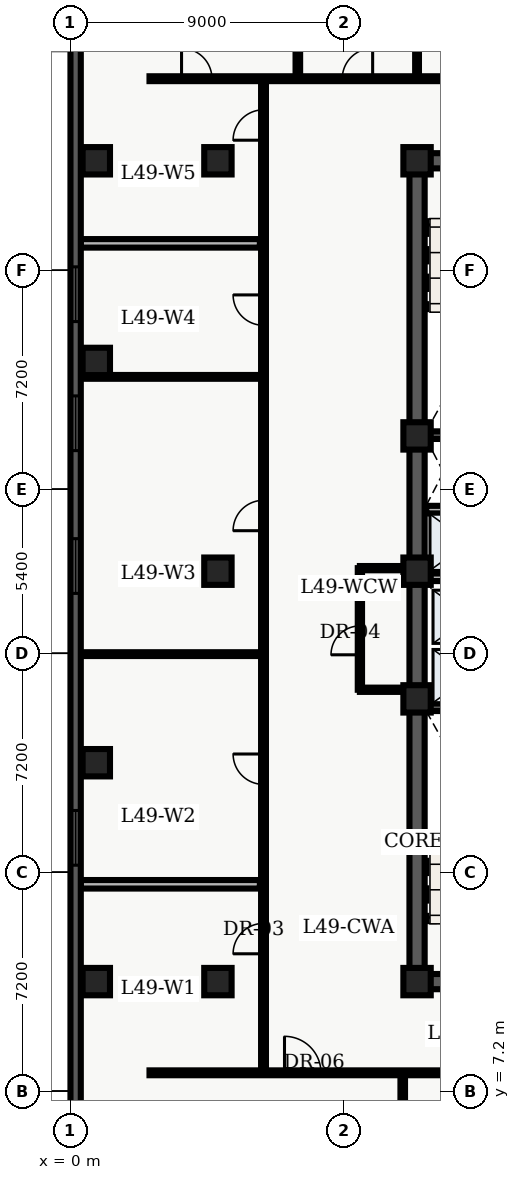
"""IFC4 building model, lengths in metres.
Left out: names, types, materials, properties, quantities, classifications, styles, units other than length and angle.
Written with IfcOpenShell. Run it as: python <this file> out.ifc"""

import sys

from ifc_helpers import new_model, entity, si_unit, converted_unit, direction, frame, origin_with_axes, origin_2d_with_axis, place, context, subcontext, project, spatial, polyline, rectangle, outline, extrude, element, fill, save


model = new_model("IFC4")
c1 = context("Model", 3, precision=1e-05, world=origin_with_axes(), true_north=direction((0.0, 1.0)))
c2 = subcontext(c1, "Body", "Model", "MODEL_VIEW")
j1 = project(units=[si_unit("LENGTHUNIT", "METRE"), converted_unit("PLANEANGLEUNIT", "DEGREE", entity("IfcPlaneAngleMeasure", 0.017), si_unit("PLANEANGLEUNIT", "RADIAN"), dimensions=[0, 0, 0, 0, 0, 0, 0])], contexts=[c1])
p1 = place(None, origin_with_axes())
s1 = spatial("IfcSite", under=j1, at=p1, CompositionType="ELEMENT")
p2 = place(p1, origin_with_axes())
s2 = spatial("IfcBuilding", under=s1, at=p2, CompositionType="ELEMENT")
p3 = place(p2, frame((0.0, 0.0, 200.4), z_axis=(0.0, 0.0, 1.0), x_axis=(1.0, 0.0, 0.0)))
s3 = spatial("IfcBuildingStorey", under=s2, at=p3, CompositionType="ELEMENT", Elevation=200.4)
p4 = place(p3, frame((11.4, 10.8, 0.0), z_axis=(0.0, 0.0, 1.0), x_axis=(0.0, 1.0, 0.0)))
e1 = element("IfcWall", 1, at=p4, inside=s3, PredefinedType="SHEAR", context=c2, shape_type="SweptSolid", body=[
    extrude(outline(polyline([(0.0, -0.25), (27.0, -0.25), (27.0, 0.25), (0.0, 0.25), (0.0, -0.25)])), origin_with_axes(), (0.0, 0.0, 1.0), 3.66),
])
p5 = place(p3, frame((11.4, 10.8, 0.0), z_axis=(0.0, 0.0, 1.0), x_axis=(1.0, 0.0, 0.0)))
e2 = element("IfcWall", 2, at=p5, inside=s3, PredefinedType="SHEAR", context=c2, shape_type="SweptSolid", body=[
    extrude(outline(polyline([(0.0, -0.25), (7.2, -0.25), (7.2, 0.25), (0.0, 0.25), (0.0, -0.25)])), origin_with_axes(), (0.0, 0.0, 1.0), 3.66),
])
p6 = place(p5, frame((2.625, 0.0, 0.0), z_axis=(0.0, 0.0, 1.0), x_axis=(1.0, 0.0, 0.0)))
e3 = element("IfcOpeningElement", 3, at=p6, cuts=e2, PredefinedType="OPENING", context=c2, shape_type="SweptSolid", body=[
    extrude(rectangle(XDim=1.05, YDim=0.52, at=origin_2d_with_axis()), origin_with_axes(), (0.0, 0.0, 1.0), 2.15),
])
p7 = place(p3, frame((11.4, 37.8, 0.0), z_axis=(0.0, 0.0, 1.0), x_axis=(1.0, 0.0, 0.0)))
e4 = element("IfcWall", 4, at=p7, inside=s3, PredefinedType="SHEAR", context=c2, shape_type="SweptSolid", body=[
    extrude(outline(polyline([(0.0, -0.25), (7.2, -0.25), (7.2, 0.25), (0.0, 0.25), (0.0, -0.25)])), origin_with_axes(), (0.0, 0.0, 1.0), 3.66),
])
p8 = place(p7, frame((2.625, 0.0, 0.0), z_axis=(0.0, 0.0, 1.0), x_axis=(1.0, 0.0, 0.0)))
e5 = element("IfcOpeningElement", 5, at=p8, cuts=e4, PredefinedType="OPENING", context=c2, shape_type="SweptSolid", body=[
    extrude(rectangle(XDim=1.05, YDim=0.52, at=origin_2d_with_axis()), origin_with_axes(), (0.0, 0.0, 1.0), 2.15),
])
for number, where, z_axis, x_axis in (
    (6, (11.65, 19.825, 0.0), (0.0, 0.0, 1.0), (1.0, 0.0, 0.0)),
    (7, (11.65, 28.775, 0.0), (0.0, 0.0, 1.0), (1.0, 0.0, 0.0)),
):
    element("IfcWall", number, at=place(p3, frame(where, z_axis=z_axis, x_axis=x_axis)), inside=s3, PredefinedType="SHEAR", context=c2, shape_type="SweptSolid", body=[
        extrude(outline(polyline([(0.0, -0.125), (6.7, -0.125), (6.7, 0.125), (0.0, 0.125), (0.0, -0.125)])), origin_with_axes(), (0.0, 0.0, 1.0), 3.66),
    ])
p9 = place(p3, frame((11.7, 24.1, 0.0), z_axis=(0.0, 0.0, 1.0), x_axis=(1.0, 0.0, 0.0)))
e8 = element("IfcWall", 8, at=p9, inside=s3, PredefinedType="SOLIDWALL", context=c2, shape_type="SweptSolid", body=[
    extrude(outline(polyline([(0.0, -0.125), (6.6, -0.125), (6.6, 0.125), (0.0, 0.125), (0.0, -0.125)])), origin_with_axes(), (0.0, 0.0, 1.0), 2.7),
])
p10 = place(p9, frame((3.75, 0.0, 0.0), z_axis=(0.0, 0.0, 1.0), x_axis=(1.0, 0.0, 0.0)))
e9 = element("IfcOpeningElement", 9, at=p10, cuts=e8, PredefinedType="OPENING", context=c2, shape_type="SweptSolid", body=[
    extrude(rectangle(XDim=0.9, YDim=0.27, at=origin_2d_with_axis()), origin_with_axes(), (0.0, 0.0, 1.0), 2.15),
])
p11 = place(p3, frame((11.7, 26.325, 0.0), z_axis=(0.0, 0.0, 1.0), x_axis=(1.0, 0.0, 0.0)))
e10 = element("IfcWall", 10, at=p11, inside=s3, PredefinedType="SOLIDWALL", context=c2, shape_type="SweptSolid", body=[
    extrude(outline(polyline([(0.0, -0.125), (6.6, -0.125), (6.6, 0.125), (0.0, 0.125), (0.0, -0.125)])), origin_with_axes(), (0.0, 0.0, 1.0), 2.7),
])
p12 = place(p11, frame((3.5, 0.0, 0.0), z_axis=(0.0, 0.0, 1.0), x_axis=(1.0, 0.0, 0.0)))
e11 = element("IfcOpeningElement", 11, at=p12, cuts=e10, PredefinedType="OPENING", context=c2, shape_type="SweptSolid", body=[
    extrude(rectangle(XDim=0.9, YDim=0.27, at=origin_2d_with_axis()), origin_with_axes(), (0.0, 0.0, 1.0), 2.15),
])
for number, where, z_axis, x_axis in (
    (12, (11.4, 10.8, 0.0), (0.0, 0.0, 1.0), (1.0, 0.0, 0.0)),
    (13, (11.4, 20.1, 0.0), (0.0, 0.0, 1.0), (1.0, 0.0, 0.0)),
    (14, (11.4, 24.3, 0.0), (0.0, 0.0, 1.0), (1.0, 0.0, 0.0)),
    (15, (11.4, 28.75, 0.0), (0.0, 0.0, 1.0), (1.0, 0.0, 0.0)),
    (16, (11.4, 37.8, 0.0), (0.0, 0.0, 1.0), (1.0, 0.0, 0.0)),
    (17, (4.85, 10.8, 0.0), (0.0, 0.0, 1.0), (1.0, 0.0, 0.0)),
    (18, (4.85, 24.3, 0.0), (0.0, 0.0, 1.0), (1.0, 0.0, 0.0)),
    (19, (4.85, 37.8, 0.0), (0.0, 0.0, 1.0), (1.0, 0.0, 0.0)),
    (20, (0.85, 10.8, 0.0), (0.0, 0.0, 1.0), (1.0, 0.0, 0.0)),
    (21, (0.85, 18.0, 0.0), (0.0, 0.0, 1.0), (1.0, 0.0, 0.0)),
    (22, (0.85, 31.2, 0.0), (0.0, 0.0, 1.0), (1.0, 0.0, 0.0)),
    (23, (0.85, 37.8, 0.0), (0.0, 0.0, 1.0), (1.0, 0.0, 0.0)),
):
    element("IfcColumn", number, at=place(p3, frame(where, z_axis=z_axis, x_axis=x_axis)), inside=s3, PredefinedType="COLUMN", context=c2, shape_type="SweptSolid", body=[
        extrude(rectangle(XDim=0.9, YDim=0.9, at=origin_2d_with_axis()), origin_with_axes(), (0.0, 0.0, 1.0), 3.9),
    ])
p13 = place(p3, frame((9.52, 20.4, 0.0), z_axis=(0.0, 0.0, 1.0), x_axis=(0.0, 1.0, 0.0)))
e24 = element("IfcWall", 24, at=p13, inside=s3, PredefinedType="PARTITIONING", context=c2, shape_type="SweptSolid", body=[
    extrude(outline(polyline([(0.0, -0.07), (4.0, -0.07), (4.0, 0.07), (0.0, 0.07), (0.0, -0.07)])), origin_with_axes(), (0.0, 0.0, 1.0), 2.7),
])
p14 = place(p13, frame((1.625, 0.0, 0.0), z_axis=(0.0, 0.0, 1.0), x_axis=(1.0, 0.0, 0.0)))
e25 = element("IfcOpeningElement", 25, at=p14, cuts=e24, PredefinedType="OPENING", context=c2, shape_type="SweptSolid", body=[
    extrude(rectangle(XDim=0.95, YDim=0.16, at=origin_2d_with_axis()), origin_with_axes(), (0.0, 0.0, 1.0), 2.15),
])
for number, where, z_axis, x_axis in (
    (26, (9.52, 20.4, 0.0), (0.0, 0.0, 1.0), (1.0, 0.0, 0.0)),
    (27, (9.52, 24.4, 0.0), (0.0, 0.0, 1.0), (1.0, 0.0, 0.0)),
):
    element("IfcWall", number, at=place(p3, frame(where, z_axis=z_axis, x_axis=x_axis)), inside=s3, PredefinedType="PARTITIONING", context=c2, shape_type="SweptSolid", body=[
        extrude(outline(polyline([(0.0, -0.07), (1.58, -0.07), (1.58, 0.07), (0.0, 0.07), (0.0, -0.07)])), origin_with_axes(), (0.0, 0.0, 1.0), 2.7),
    ])
p15 = place(p3, frame((2.6, 7.8, 0.0), z_axis=(0.0, 0.0, 1.0), x_axis=(1.0, 0.0, 0.0)))
e28 = element("IfcWall", 28, at=p15, inside=s3, PredefinedType="PARTITIONING", context=c2, shape_type="SweptSolid", body=[
    extrude(outline(polyline([(0.0, -0.08), (18.55, -0.08), (18.55, 0.08), (0.0, 0.08), (0.0, -0.08)])), origin_with_axes(), (0.0, 0.0, 1.0), 2.7),
])
p16 = place(p15, frame((5.04, 0.0, 0.0), z_axis=(0.0, 0.0, 1.0), x_axis=(1.0, 0.0, 0.0)))
e29 = element("IfcOpeningElement", 29, at=p16, cuts=e28, PredefinedType="OPENING", context=c2, shape_type="SweptSolid", body=[
    extrude(rectangle(XDim=1.2, YDim=0.18, at=origin_2d_with_axis()), origin_with_axes(), (0.0, 0.0, 1.0), 2.2),
])
p17 = place(p15, frame((13.415, 0.0, 0.0), z_axis=(0.0, 0.0, 1.0), x_axis=(1.0, 0.0, 0.0)))
e30 = element("IfcOpeningElement", 30, at=p17, cuts=e28, PredefinedType="OPENING", context=c2, shape_type="SweptSolid", body=[
    extrude(rectangle(XDim=1.0, YDim=0.18, at=origin_2d_with_axis()), origin_with_axes(), (0.0, 0.0, 1.0), 2.15),
])
p18 = place(p3, frame((2.6, 40.5, 0.0), z_axis=(0.0, 0.0, 1.0), x_axis=(1.0, 0.0, 0.0)))
e31 = element("IfcWall", 31, at=p18, inside=s3, PredefinedType="PARTITIONING", context=c2, shape_type="SweptSolid", body=[
    extrude(outline(polyline([(0.0, -0.08), (26.177, -0.08), (26.177, 0.08), (0.0, 0.08), (0.0, -0.08)])), origin_with_axes(), (0.0, 0.0, 1.0), 2.7),
])
p19 = place(p18, frame((1.554, 0.0, 0.0), z_axis=(0.0, 0.0, 1.0), x_axis=(1.0, 0.0, 0.0)))
e32 = element("IfcOpeningElement", 32, at=p19, cuts=e31, PredefinedType="OPENING", context=c2, shape_type="SweptSolid", body=[
    extrude(rectangle(XDim=1.0, YDim=0.18, at=origin_2d_with_axis()), origin_with_axes(), (0.0, 0.0, 1.0), 2.15),
])
p20 = place(p18, frame((6.84, 0.0, 0.0), z_axis=(0.0, 0.0, 1.0), x_axis=(1.0, 0.0, 0.0)))
e33 = element("IfcOpeningElement", 33, at=p20, cuts=e31, PredefinedType="OPENING", context=c2, shape_type="SweptSolid", body=[
    extrude(rectangle(XDim=1.0, YDim=0.18, at=origin_2d_with_axis()), origin_with_axes(), (0.0, 0.0, 1.0), 2.15),
])
p21 = place(p18, frame((10.996, 0.0, 0.0), z_axis=(0.0, 0.0, 1.0), x_axis=(1.0, 0.0, 0.0)))
e34 = element("IfcOpeningElement", 34, at=p21, cuts=e31, PredefinedType="OPENING", context=c2, shape_type="SweptSolid", body=[
    extrude(rectangle(XDim=1.0, YDim=0.18, at=origin_2d_with_axis()), origin_with_axes(), (0.0, 0.0, 1.0), 2.15),
])
p22 = place(p18, frame((15.636, 0.0, 0.0), z_axis=(0.0, 0.0, 1.0), x_axis=(1.0, 0.0, 0.0)))
e35 = element("IfcOpeningElement", 35, at=p22, cuts=e31, PredefinedType="OPENING", context=c2, shape_type="SweptSolid", body=[
    extrude(rectangle(XDim=1.0, YDim=0.18, at=origin_2d_with_axis()), origin_with_axes(), (0.0, 0.0, 1.0), 2.15),
])
p23 = place(p3, frame((6.35, 7.8, 0.0), z_axis=(0.0, 0.0, 1.0), x_axis=(0.0, 1.0, 0.0)))
e36 = element("IfcWall", 36, at=p23, inside=s3, PredefinedType="PARTITIONING", context=c2, shape_type="SweptSolid", body=[
    extrude(outline(polyline([(0.0, -0.08), (32.7, -0.08), (32.7, 0.08), (0.0, 0.08), (0.0, -0.08)])), origin_with_axes(), (0.0, 0.0, 1.0), 2.7),
])
p24 = place(p23, frame((4.415, 0.0, 0.0), z_axis=(0.0, 0.0, 1.0), x_axis=(1.0, 0.0, 0.0)))
e37 = element("IfcOpeningElement", 37, at=p24, cuts=e36, PredefinedType="OPENING", context=c2, shape_type="SweptSolid", body=[
    extrude(rectangle(XDim=1.0, YDim=0.18, at=origin_2d_with_axis()), origin_with_axes(), (0.0, 0.0, 1.0), 2.15),
])
p25 = place(p23, frame((9.986, 0.0, 0.0), z_axis=(0.0, 0.0, 1.0), x_axis=(1.0, 0.0, 0.0)))
e38 = element("IfcOpeningElement", 38, at=p25, cuts=e36, PredefinedType="OPENING", context=c2, shape_type="SweptSolid", body=[
    extrude(rectangle(XDim=1.0, YDim=0.18, at=origin_2d_with_axis()), origin_with_axes(), (0.0, 0.0, 1.0), 2.15),
])
p26 = place(p23, frame((18.332, 0.0, 0.0), z_axis=(0.0, 0.0, 1.0), x_axis=(1.0, 0.0, 0.0)))
e39 = element("IfcOpeningElement", 39, at=p26, cuts=e36, PredefinedType="OPENING", context=c2, shape_type="SweptSolid", body=[
    extrude(rectangle(XDim=1.0, YDim=0.18, at=origin_2d_with_axis()), origin_with_axes(), (0.0, 0.0, 1.0), 2.15),
])
p27 = place(p23, frame((25.088, 0.0, 0.0), z_axis=(0.0, 0.0, 1.0), x_axis=(1.0, 0.0, 0.0)))
e40 = element("IfcOpeningElement", 40, at=p27, cuts=e36, PredefinedType="OPENING", context=c2, shape_type="SweptSolid", body=[
    extrude(rectangle(XDim=1.0, YDim=0.18, at=origin_2d_with_axis()), origin_with_axes(), (0.0, 0.0, 1.0), 2.15),
])
p28 = place(p23, frame((31.177, 0.0, 0.0), z_axis=(0.0, 0.0, 1.0), x_axis=(1.0, 0.0, 0.0)))
e41 = element("IfcOpeningElement", 41, at=p28, cuts=e36, PredefinedType="OPENING", context=c2, shape_type="SweptSolid", body=[
    extrude(rectangle(XDim=1.0, YDim=0.18, at=origin_2d_with_axis()), origin_with_axes(), (0.0, 0.0, 1.0), 2.15),
])
p29 = place(p3, frame((0.335, 14.001, 0.0), z_axis=(0.0, 0.0, 1.0), x_axis=(1.0, 0.0, 0.0)))
e42 = element("IfcWall", 42, at=p29, inside=s3, PredefinedType="PARTITIONING", context=c2, shape_type="SweptSolid", body=[
    extrude(outline(polyline([(0.0, -0.14), (5.895, -0.14), (5.895, 0.14), (0.0, 0.14), (0.0, -0.14)])), origin_with_axes(), (0.0, 0.0, 1.0), 2.7),
])
for number, where, z_axis, x_axis in (
    (43, (0.335, 21.572, 0.0), (0.0, 0.0, 1.0), (1.0, 0.0, 0.0)),
    (44, (0.335, 30.692, 0.0), (0.0, 0.0, 1.0), (1.0, 0.0, 0.0)),
):
    element("IfcWall", number, at=place(p3, frame(where, z_axis=z_axis, x_axis=x_axis)), inside=s3, PredefinedType="PARTITIONING", context=c2, shape_type="SweptSolid", body=[
        extrude(outline(polyline([(0.0, -0.062), (5.895, -0.062), (5.895, 0.062), (0.0, 0.062), (0.0, -0.062)])), origin_with_axes(), (0.0, 0.0, 1.0), 2.7),
    ])
p30 = place(p3, frame((0.335, 35.084, 0.0), z_axis=(0.0, 0.0, 1.0), x_axis=(1.0, 0.0, 0.0)))
e45 = element("IfcWall", 45, at=p30, inside=s3, PredefinedType="PARTITIONING", context=c2, shape_type="SweptSolid", body=[
    extrude(outline(polyline([(0.0, -0.14), (5.895, -0.14), (5.895, 0.14), (0.0, 0.14), (0.0, -0.14)])), origin_with_axes(), (0.0, 0.0, 1.0), 2.7),
])
p31 = place(p3, frame((10.929, 0.335, 0.0), z_axis=(0.0, 0.0, 1.0), x_axis=(0.0, 1.0, 0.0)))
e46 = element("IfcWall", 46, at=p31, inside=s3, PredefinedType="PARTITIONING", context=c2, shape_type="SweptSolid", body=[
    extrude(outline(polyline([(0.0, -0.075), (7.365, -0.075), (7.365, 0.075), (0.0, 0.075), (0.0, -0.075)])), origin_with_axes(), (0.0, 0.0, 1.0), 2.7),
])
p32 = place(p3, frame((7.479, 40.6, 0.0), z_axis=(0.0, 0.0, 1.0), x_axis=(0.0, 1.0, 0.0)))
e47 = element("IfcWall", 47, at=p32, inside=s3, PredefinedType="PARTITIONING", context=c2, shape_type="SweptSolid", body=[
    extrude(outline(polyline([(0.0, -0.075), (7.665, -0.075), (7.665, 0.075), (0.0, 0.075), (0.0, -0.075)])), origin_with_axes(), (0.0, 0.0, 1.0), 2.7),
])
p33 = place(p3, frame((11.4, 40.6, 0.0), z_axis=(0.0, 0.0, 1.0), x_axis=(0.0, 1.0, 0.0)))
e48 = element("IfcWall", 48, at=p33, inside=s3, PredefinedType="PARTITIONING", context=c2, shape_type="SweptSolid", body=[
    extrude(outline(polyline([(0.0, -0.062), (7.665, -0.062), (7.665, 0.062), (0.0, 0.062), (0.0, -0.062)])), origin_with_axes(), (0.0, 0.0, 1.0), 2.7),
])
p34 = place(p3, frame((0.17, 2.74, 0.0), z_axis=(0.0, 0.0, 1.0), x_axis=(0.0, 1.0, 0.0)))
e49 = element("IfcWall", 49, at=p34, inside=s3, PredefinedType="SOLIDWALL", context=c2, shape_type="SweptSolid", body=[
    extrude(outline(polyline([(0.0, -0.17), (43.46, -0.17), (43.46, 0.17), (0.0, 0.17), (0.0, -0.17)])), origin_with_axes(), (0.0, 0.0, 1.0), 3.66),
])
p35 = place(p34, frame((2.948, 0.0, 0.45), z_axis=(0.0, 0.0, 1.0), x_axis=(1.0, 0.0, 0.0)))
e50 = element("IfcOpeningElement", 50, at=p35, cuts=e49, PredefinedType="OPENING", context=c2, shape_type="SweptSolid", body=[
    extrude(rectangle(XDim=1.8, YDim=0.36, at=origin_2d_with_axis()), origin_with_axes(), (0.0, 0.0, 1.0), 2.1),
])
p36 = place(p34, frame((12.789, 0.0, 0.45), z_axis=(0.0, 0.0, 1.0), x_axis=(1.0, 0.0, 0.0)))
e51 = element("IfcOpeningElement", 51, at=p36, cuts=e49, PredefinedType="OPENING", context=c2, shape_type="SweptSolid", body=[
    extrude(rectangle(XDim=1.8, YDim=0.36, at=origin_2d_with_axis()), origin_with_axes(), (0.0, 0.0, 1.0), 2.1),
])
p37 = place(p34, frame((21.73, 0.0, 0.45), z_axis=(0.0, 0.0, 1.0), x_axis=(1.0, 0.0, 0.0)))
e52 = element("IfcOpeningElement", 52, at=p37, cuts=e49, PredefinedType="OPENING", context=c2, shape_type="SweptSolid", body=[
    extrude(rectangle(XDim=1.8, YDim=0.36, at=origin_2d_with_axis()), origin_with_axes(), (0.0, 0.0, 1.0), 2.1),
])
p38 = place(p34, frame((26.426, 0.0, 0.45), z_axis=(0.0, 0.0, 1.0), x_axis=(1.0, 0.0, 0.0)))
e53 = element("IfcOpeningElement", 53, at=p38, cuts=e49, PredefinedType="OPENING", context=c2, shape_type="SweptSolid", body=[
    extrude(rectangle(XDim=1.8, YDim=0.36, at=origin_2d_with_axis()), origin_with_axes(), (0.0, 0.0, 1.0), 2.1),
])
p39 = place(p34, frame((30.671, 0.0, 0.45), z_axis=(0.0, 0.0, 1.0), x_axis=(1.0, 0.0, 0.0)))
e54 = element("IfcOpeningElement", 54, at=p39, cuts=e49, PredefinedType="OPENING", context=c2, shape_type="SweptSolid", body=[
    extrude(rectangle(XDim=1.8, YDim=0.36, at=origin_2d_with_axis()), origin_with_axes(), (0.0, 0.0, 1.0), 2.1),
])
p40 = place(p34, frame((40.062, 0.0, 0.45), z_axis=(0.0, 0.0, 1.0), x_axis=(1.0, 0.0, 0.0)))
e55 = element("IfcOpeningElement", 55, at=p40, cuts=e49, PredefinedType="OPENING", context=c2, shape_type="SweptSolid", body=[
    extrude(rectangle(XDim=1.8, YDim=0.36, at=origin_2d_with_axis()), origin_with_axes(), (0.0, 0.0, 1.0), 2.1),
])
p41 = place(p13, frame((1.625, 0.0, 0.0), z_axis=(0.0, 0.0, 1.0), x_axis=(1.0, 0.0, 0.0)))
e56 = element("IfcDoor", 56, at=p41, inside=s3, OperationType="SINGLE_SWING_LEFT", PredefinedType="DOOR", context=c2, shape_type="SweptSolid", body=[
    extrude(rectangle(XDim=0.95, YDim=0.084, at=origin_2d_with_axis()), origin_with_axes(), (0.0, 0.0, 1.0), 2.15),
])
fill(e25, e56)
p42 = place(p23, frame((4.415, 0.0, 0.0), z_axis=(0.0, 0.0, 1.0), x_axis=(1.0, 0.0, 0.0)))
e57 = element("IfcDoor", 57, at=p42, inside=s3, OperationType="SINGLE_SWING_LEFT", PredefinedType="DOOR", context=c2, shape_type="SweptSolid", body=[
    extrude(rectangle(XDim=1.0, YDim=0.09, at=origin_2d_with_axis()), origin_with_axes(), (0.0, 0.0, 1.0), 2.15),
])
fill(e37, e57)
p43 = place(p23, frame((9.986, 0.0, 0.0), z_axis=(0.0, 0.0, 1.0), x_axis=(1.0, 0.0, 0.0)))
e58 = element("IfcDoor", 58, at=p43, inside=s3, OperationType="SINGLE_SWING_RIGHT", PredefinedType="DOOR", context=c2, shape_type="SweptSolid", body=[
    extrude(rectangle(XDim=1.0, YDim=0.09, at=origin_2d_with_axis()), origin_with_axes(), (0.0, 0.0, 1.0), 2.15),
])
fill(e38, e58)
p44 = place(p23, frame((18.332, 0.0, 0.0), z_axis=(0.0, 0.0, 1.0), x_axis=(1.0, 0.0, 0.0)))
e59 = element("IfcDoor", 59, at=p44, inside=s3, OperationType="SINGLE_SWING_LEFT", PredefinedType="DOOR", context=c2, shape_type="SweptSolid", body=[
    extrude(rectangle(XDim=1.0, YDim=0.09, at=origin_2d_with_axis()), origin_with_axes(), (0.0, 0.0, 1.0), 2.15),
])
fill(e39, e59)
p45 = place(p23, frame((25.088, 0.0, 0.0), z_axis=(0.0, 0.0, 1.0), x_axis=(1.0, 0.0, 0.0)))
e60 = element("IfcDoor", 60, at=p45, inside=s3, OperationType="SINGLE_SWING_RIGHT", PredefinedType="DOOR", context=c2, shape_type="SweptSolid", body=[
    extrude(rectangle(XDim=1.0, YDim=0.09, at=origin_2d_with_axis()), origin_with_axes(), (0.0, 0.0, 1.0), 2.15),
])
fill(e40, e60)
p46 = place(p23, frame((31.177, 0.0, 0.0), z_axis=(0.0, 0.0, 1.0), x_axis=(1.0, 0.0, 0.0)))
e61 = element("IfcDoor", 61, at=p46, inside=s3, OperationType="SINGLE_SWING_LEFT", PredefinedType="DOOR", context=c2, shape_type="SweptSolid", body=[
    extrude(rectangle(XDim=1.0, YDim=0.09, at=origin_2d_with_axis()), origin_with_axes(), (0.0, 0.0, 1.0), 2.15),
])
fill(e41, e61)
p47 = place(p15, frame((5.04, 0.0, 0.0), z_axis=(0.0, 0.0, 1.0), x_axis=(1.0, 0.0, 0.0)))
e62 = element("IfcDoor", 62, at=p47, inside=s3, OperationType="SINGLE_SWING_LEFT", PredefinedType="DOOR", context=c2, shape_type="SweptSolid", body=[
    extrude(rectangle(XDim=1.2, YDim=0.09, at=origin_2d_with_axis()), origin_with_axes(), (0.0, 0.0, 1.0), 2.2),
])
fill(e29, e62)
p48 = place(p18, frame((1.554, 0.0, 0.0), z_axis=(0.0, 0.0, 1.0), x_axis=(1.0, 0.0, 0.0)))
e63 = element("IfcDoor", 63, at=p48, inside=s3, OperationType="SINGLE_SWING_LEFT", PredefinedType="DOOR", context=c2, shape_type="SweptSolid", body=[
    extrude(rectangle(XDim=1.0, YDim=0.09, at=origin_2d_with_axis()), origin_with_axes(), (0.0, 0.0, 1.0), 2.15),
])
fill(e32, e63)
p49 = place(p18, frame((6.84, 0.0, 0.0), z_axis=(0.0, 0.0, 1.0), x_axis=(1.0, 0.0, 0.0)))
e64 = element("IfcDoor", 64, at=p49, inside=s3, OperationType="SINGLE_SWING_RIGHT", PredefinedType="DOOR", context=c2, shape_type="SweptSolid", body=[
    extrude(rectangle(XDim=1.0, YDim=0.09, at=origin_2d_with_axis()), origin_with_axes(), (0.0, 0.0, 1.0), 2.15),
])
fill(e33, e64)
p50 = place(p34, frame((12.789, 0.0, 0.45), z_axis=(0.0, 0.0, 1.0), x_axis=(1.0, 0.0, 0.0)))
e65 = element("IfcWindow", 65, at=p50, inside=s3, PredefinedType="WINDOW", context=c2, shape_type="SweptSolid", body=[
    extrude(rectangle(XDim=1.8, YDim=0.09, at=origin_2d_with_axis()), origin_with_axes(), (0.0, 0.0, 1.0), 2.1),
])
fill(e51, e65)
p51 = place(p34, frame((21.73, 0.0, 0.45), z_axis=(0.0, 0.0, 1.0), x_axis=(1.0, 0.0, 0.0)))
e66 = element("IfcWindow", 66, at=p51, inside=s3, PredefinedType="WINDOW", context=c2, shape_type="SweptSolid", body=[
    extrude(rectangle(XDim=1.8, YDim=0.09, at=origin_2d_with_axis()), origin_with_axes(), (0.0, 0.0, 1.0), 2.1),
])
fill(e52, e66)
p52 = place(p34, frame((26.426, 0.0, 0.45), z_axis=(0.0, 0.0, 1.0), x_axis=(1.0, 0.0, 0.0)))
e67 = element("IfcWindow", 67, at=p52, inside=s3, PredefinedType="WINDOW", context=c2, shape_type="SweptSolid", body=[
    extrude(rectangle(XDim=1.8, YDim=0.09, at=origin_2d_with_axis()), origin_with_axes(), (0.0, 0.0, 1.0), 2.1),
])
fill(e53, e67)
p53 = place(p34, frame((30.671, 0.0, 0.45), z_axis=(0.0, 0.0, 1.0), x_axis=(1.0, 0.0, 0.0)))
e68 = element("IfcWindow", 68, at=p53, inside=s3, PredefinedType="WINDOW", context=c2, shape_type="SweptSolid", body=[
    extrude(rectangle(XDim=1.8, YDim=0.09, at=origin_2d_with_axis()), origin_with_axes(), (0.0, 0.0, 1.0), 2.1),
])
fill(e54, e68)
save(model, sys.argv[1])
